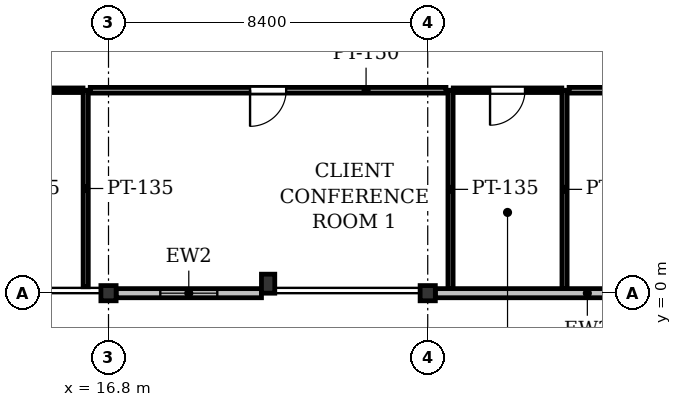
"""IFC4 building model, lengths in metres.
Left out: names, types, materials, properties, quantities, classifications, styles, units other than length and angle.
Written with IfcOpenShell. Run it as: python <this file> out.ifc"""

import sys

from ifc_helpers import new_model, si_unit, direction, frame, frame_2d, origin, origin_2d, place, context, subcontext, project, spatial, rectangle, i_section, extrude, element, fill, save


model = new_model("IFC4")
c1 = context("Model", 3, precision=1e-05, world=origin(), true_north=direction((0.0, 1.0)))
c2 = subcontext(c1, "Body", "Model", "MODEL_VIEW")
j1 = project(units=[si_unit("LENGTHUNIT", "METRE"), si_unit("PLANEANGLEUNIT", "RADIAN")], contexts=[c1])
p1 = place(None, origin())
s1 = spatial("IfcSite", under=j1, at=p1, CompositionType="ELEMENT")
p2 = place(p1, origin())
s2 = spatial("IfcBuilding", under=s1, at=p2, CompositionType="ELEMENT")
p3 = place(p2, frame((0.0, 0.0, 117.2)))
s3 = spatial("IfcBuildingStorey", under=s2, at=p3, CompositionType="ELEMENT", Elevation=117.2)
for number, where, z_axis, x_axis in (
    (1, (16.8, 0.0, 0.0), (0.0, 0.0, 1.0), (1.0, 0.0, 0.0)),
    (2, (25.2, 0.0, 0.0), (0.0, 0.0, 1.0), (1.0, 0.0, 0.0)),
):
    element("IfcColumn", number, at=place(p3, frame(where, z_axis=z_axis, x_axis=x_axis)), inside=s3, PredefinedType="COLUMN", context=c2, shape_type="SweptSolid", body=[
        extrude(i_section(OverallWidth=0.4, OverallDepth=0.4, WebThickness=0.025, FlangeThickness=0.04, at=origin_2d()), origin(), (0.0, 0.0, 1.0), 4.1),
    ])
p4 = place(p3, frame((21.0, 0.25, 0.0), z_axis=(0.0, 0.0, 1.0), x_axis=(1.0, 0.0, 0.0)))
e3 = element("IfcColumn", 3, at=p4, inside=s3, PredefinedType="PILASTER", context=c2, shape_type="SweptSolid", body=[
    extrude(rectangle(XDim=0.35, YDim=0.5, at=origin_2d()), origin(), (0.0, 0.0, 1.0), 4.1),
])
p5 = place(p3, frame((33.4, 0.0, 0.0), z_axis=(0.0, 0.0, 1.0), x_axis=(-1.0, 0.0, 0.0)))
e4 = element("IfcWall", 4, at=p5, inside=s3, PredefinedType="STANDARD", context=c2, shape_type="SweptSolid", body=[
    extrude(rectangle(XDim=8.0, YDim=0.24, at=frame_2d((4.0, 0.0))), origin(), (0.0, 0.0, 1.0), 3.422),
])
p6 = place(p5, frame((1.535, 0.0, 0.9)))
e5 = element("IfcOpeningElement", 5, at=p6, cuts=e4, PredefinedType="OPENING", context=c2, shape_type="SweptSolid", body=[
    extrude(rectangle(XDim=1.5, YDim=1.6, at=frame_2d((0.75, 0.8))), frame((0.0, 0.13, 0.0), z_axis=(0.0, -1.0, 0.0), x_axis=(1.0, 0.0, 0.0)), (0.0, 0.0, 1.0), 0.26),
])
p7 = place(p3, frame((20.825, 0.0, 0.0), z_axis=(0.0, 0.0, 1.0), x_axis=(-1.0, 0.0, 0.0)))
e6 = element("IfcWall", 6, at=p7, inside=s3, PredefinedType="STANDARD", context=c2, shape_type="SweptSolid", body=[
    extrude(rectangle(XDim=3.825, YDim=0.24, at=frame_2d((1.913, 0.0))), origin(), (0.0, 0.0, 1.0), 3.422),
])
p8 = place(p7, frame((1.163, 0.0, 0.9)))
e7 = element("IfcOpeningElement", 7, at=p8, cuts=e6, PredefinedType="OPENING", context=c2, shape_type="SweptSolid", body=[
    extrude(rectangle(XDim=1.5, YDim=1.6, at=frame_2d((0.75, 0.8))), frame((0.0, 0.13, 0.0), z_axis=(0.0, -1.0, 0.0), x_axis=(1.0, 0.0, 0.0)), (0.0, 0.0, 1.0), 0.26),
])
p9 = place(p3, frame((16.2, 0.169, 0.0), z_axis=(0.0, 0.0, 1.0), x_axis=(0.0, 1.0, 0.0)))
e8 = element("IfcWall", 8, at=p9, inside=s3, PredefinedType="PARTITIONING", context=c2, shape_type="SweptSolid", body=[
    extrude(rectangle(XDim=5.171, YDim=0.135, at=frame_2d((2.585, 0.0))), origin(), (0.0, 0.0, 1.0), 3.825),
])
p10 = place(p3, frame((16.128, 5.34, 0.0), z_axis=(0.0, 0.0, 1.0), x_axis=(-1.0, 0.0, 0.0)))
e9 = element("IfcWall", 9, at=p10, inside=s3, PredefinedType="PARTITIONING", context=c2, shape_type="SweptSolid", body=[
    extrude(rectangle(XDim=2.857, YDim=0.12, at=frame_2d((1.428, 0.0))), origin(), (0.0, 0.0, 1.0), 3.825),
])
p11 = place(p10, frame((0.969, 0.0, 0.0)))
e10 = element("IfcOpeningElement", 10, at=p11, cuts=e9, PredefinedType="OPENING", context=c2, shape_type="SweptSolid", body=[
    extrude(rectangle(XDim=0.92, YDim=2.1, at=frame_2d((0.46, 1.05))), frame((0.0, 0.07, 0.0), z_axis=(0.0, -1.0, 0.0), x_axis=(1.0, 0.0, 0.0)), (0.0, 0.0, 1.0), 0.14),
])
for number, where, z_axis, x_axis in (
    (11, (25.8, 5.34, 0.0), (0.0, 0.0, 1.0), (0.0, -1.0, 0.0)),
    (12, (28.8, 0.124, 0.0), (0.0, 0.0, 1.0), (0.0, 1.0, 0.0)),
):
    element("IfcWall", number, at=place(p3, frame(where, z_axis=z_axis, x_axis=x_axis)), inside=s3, PredefinedType="PARTITIONING", context=c2, shape_type="SweptSolid", body=[
        extrude(rectangle(XDim=5.216, YDim=0.135, at=frame_2d((2.608, 0.0))), origin(), (0.0, 0.0, 1.0), 3.825),
    ])
p12 = place(p3, frame((28.729, 5.34, 0.0), z_axis=(0.0, 0.0, 1.0), x_axis=(-1.0, 0.0, 0.0)))
e13 = element("IfcWall", 13, at=p12, inside=s3, PredefinedType="PARTITIONING", context=c2, shape_type="SweptSolid", body=[
    extrude(rectangle(XDim=2.857, YDim=0.12, at=frame_2d((1.428, 0.0))), origin(), (0.0, 0.0, 1.0), 3.825),
])
p13 = place(p12, frame((0.969, 0.0, 0.0)))
e14 = element("IfcOpeningElement", 14, at=p13, cuts=e13, PredefinedType="OPENING", context=c2, shape_type="SweptSolid", body=[
    extrude(rectangle(XDim=0.92, YDim=2.1, at=frame_2d((0.46, 1.05))), frame((0.0, 0.07, 0.0), z_axis=(0.0, -1.0, 0.0), x_axis=(1.0, 0.0, 0.0)), (0.0, 0.0, 1.0), 0.14),
])
p14 = place(p3, frame((25.68, 5.34, 0.0), z_axis=(0.0, 0.0, 1.0), x_axis=(-1.0, 0.0, 0.0)))
e15 = element("IfcWall", 15, at=p14, inside=s3, PredefinedType="PARTITIONING", context=c2, shape_type="SweptSolid", body=[
    extrude(rectangle(XDim=9.36, YDim=0.15, at=frame_2d((4.68, 0.0))), origin(), (0.0, 0.0, 1.0), 3.297),
])
p15 = place(p14, frame((4.205, 0.0, 0.0)))
e16 = element("IfcOpeningElement", 16, at=p15, cuts=e15, PredefinedType="OPENING", context=c2, shape_type="SweptSolid", body=[
    extrude(rectangle(XDim=0.95, YDim=2.15, at=frame_2d((0.475, 1.075))), frame((0.0, 0.085, 0.0), z_axis=(0.0, -1.0, 0.0), x_axis=(1.0, 0.0, 0.0)), (0.0, 0.0, 1.0), 0.17),
])
p16 = place(p3, frame((36.65, 5.34, 0.0), z_axis=(0.0, 0.0, 1.0), x_axis=(-1.0, 0.0, 0.0)))
e17 = element("IfcWall", 17, at=p16, inside=s3, PredefinedType="PARTITIONING", context=c2, shape_type="SweptSolid", body=[
    extrude(rectangle(XDim=7.73, YDim=0.15, at=frame_2d((3.865, 0.0))), origin(), (0.0, 0.0, 1.0), 3.297),
])
p17 = place(p8, origin())
e18 = element("IfcWindow", 18, at=p17, inside=s3, PartitioningType="SINGLE_PANEL", PredefinedType="WINDOW", context=c2, shape_type="SweptSolid", body=[
    extrude(rectangle(XDim=1.5, YDim=1.6, at=frame_2d((0.75, 0.8))), frame((0.0, 0.03, 0.0), z_axis=(0.0, -1.0, 0.0), x_axis=(1.0, 0.0, 0.0)), (0.0, 0.0, 1.0), 0.06),
])
fill(e7, e18)
p18 = place(p13, origin())
e19 = element("IfcDoor", 19, at=p18, inside=s3, OperationType="SINGLE_SWING_RIGHT", PredefinedType="DOOR", context=c2, shape_type="SweptSolid", body=[
    extrude(rectangle(XDim=0.92, YDim=2.1, at=frame_2d((0.46, 1.05))), frame((0.0, 0.025, 0.0), z_axis=(0.0, -1.0, 0.0), x_axis=(1.0, 0.0, 0.0)), (0.0, 0.0, 1.0), 0.05),
])
fill(e14, e19)
p19 = place(p15, origin())
e20 = element("IfcDoor", 20, at=p19, inside=s3, OperationType="SINGLE_SWING_RIGHT", PredefinedType="DOOR", context=c2, shape_type="SweptSolid", body=[
    extrude(rectangle(XDim=0.95, YDim=2.15, at=frame_2d((0.475, 1.075))), frame((0.0, 0.025, 0.0), z_axis=(0.0, -1.0, 0.0), x_axis=(1.0, 0.0, 0.0)), (0.0, 0.0, 1.0), 0.05),
])
fill(e16, e20)
save(model, sys.argv[1])
